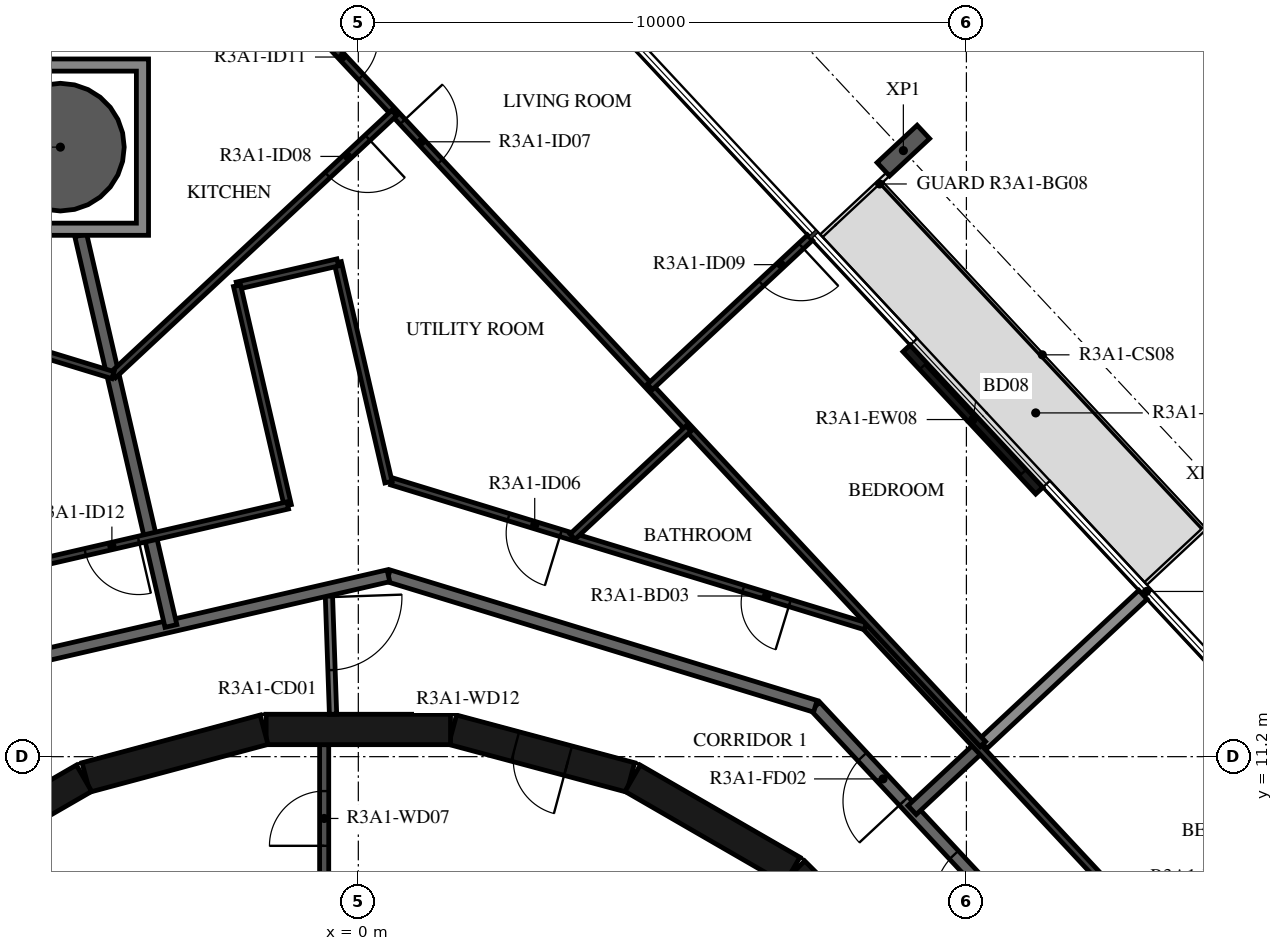
"""IFC4 building model, lengths in metres.
Left out: names, types, materials, properties, quantities, classifications, styles, units other than length and angle.
Written with IfcOpenShell. Run it as: python <this file> out.ifc"""

import sys

from ifc_helpers import new_model, si_unit, direction, frame, frame_2d, origin, origin_2d, place, context, subcontext, project, spatial, polyline, rectangle, hollow_circle, i_section, outline, extrude, element, fill, save


model = new_model("IFC4")
c1 = context("Model", 3, precision=1e-05, world=origin(), true_north=direction((0.0, 1.0)))
c2 = subcontext(c1, "Body", "Model", "MODEL_VIEW")
j1 = project(units=[si_unit("LENGTHUNIT", "METRE"), si_unit("PLANEANGLEUNIT", "RADIAN")], contexts=[c1])
p1 = place(None, origin())
s1 = spatial("IfcSite", under=j1, at=p1, CompositionType="ELEMENT")
p2 = place(p1, origin())
s2 = spatial("IfcBuilding", under=s1, at=p2, CompositionType="ELEMENT")
p3 = place(p2, frame((0.0, 0.0, 116.9)))
s3 = spatial("IfcBuildingStorey", under=s2, at=p3, CompositionType="ELEMENT", Elevation=116.9)
p4 = place(p3, frame((-4.9, 21.223, -0.38), z_axis=(0.0, 0.0, 1.0), x_axis=(1.0, 0.0, 0.0)))
e1 = element("IfcColumn", 1, at=p4, inside=s3, PredefinedType="COLUMN", context=c2, shape_type="SweptSolid", body=[
    extrude(hollow_circle(Radius=1.05, WallThickness=0.05, at=origin_2d()), origin(), (0.0, 0.0, 1.0), 3.5),
])
p5 = place(p3, frame((8.963, 21.167, -0.38), z_axis=(0.0, 0.0, 1.0), x_axis=(0.68199801865, -0.731354019992, 0.0)))
e2 = element("IfcColumn", 2, at=p5, inside=s3, PredefinedType="COLUMN", context=c2, shape_type="SweptSolid", body=[
    extrude(i_section(OverallWidth=0.3, OverallDepth=0.9, WebThickness=0.019, FlangeThickness=0.035, FilletRadius=0.03, at=origin_2d()), origin(), (0.0, 0.0, 1.0), 3.5),
])
p6 = place(p3, frame((11.198, 15.574, 0.0), z_axis=(0.0, 0.0, 1.0), x_axis=(-0.681994703002, 0.731357111866, 0.0)))
e3 = element("IfcWall", 3, at=p6, inside=s3, PredefinedType="STANDARD", context=c2, shape_type="SweptSolid", body=[
    extrude(rectangle(XDim=3.2, YDim=0.16, at=frame_2d((1.6, 0.0))), origin(), (0.0, 0.0, 1.0), 3.12),
])
p7 = place(p6, frame((0.4, 0.0, 0.0)))
e4 = element("IfcOpeningElement", 4, at=p7, cuts=e3, PredefinedType="OPENING", context=c2, shape_type="SweptSolid", body=[
    extrude(rectangle(XDim=2.4, YDim=2.4, at=frame_2d((1.2, 1.2))), frame((0.0, 0.09, 0.0), z_axis=(0.0, -1.0, 0.0), x_axis=(1.0, 0.0, 0.0)), (0.0, 0.0, 1.0), 0.18),
])
p8 = place(p3, frame((9.308, 7.164, 0.0), z_axis=(0.0, 0.0, 1.0), x_axis=(-0.707106781187, 0.707106781187, 0.0)))
e5 = element("IfcWall", 5, at=p8, inside=s3, PredefinedType="SHEAR", context=c2, shape_type="SweptSolid", body=[
    extrude(rectangle(XDim=3.032, YDim=0.5, at=frame_2d((1.516, 0.0))), origin(), (0.0, 0.0, 1.0), 3.12),
])
p9 = place(p8, frame((0.416, 0.0, 0.0)))
e6 = element("IfcOpeningElement", 6, at=p9, cuts=e5, PredefinedType="OPENING", context=c2, shape_type="SweptSolid", body=[
    extrude(rectangle(XDim=1.2, YDim=2.1, at=frame_2d((0.6, 1.05))), frame((0.0, 0.26, 0.0), z_axis=(0.0, -1.0, 0.0), x_axis=(1.0, 0.0, 0.0)), (0.0, 0.0, 1.0), 0.52),
])
p10 = place(p3, frame((7.137, 9.329, 0.0), z_axis=(0.0, 0.0, 1.0), x_axis=(-0.865975092491, 0.500087131594, 0.0)))
e7 = element("IfcWall", 7, at=p10, inside=s3, PredefinedType="SHEAR", context=c2, shape_type="SweptSolid", body=[
    extrude(rectangle(XDim=3.033, YDim=0.5, at=frame_2d((1.516, 0.0))), origin(), (0.0, 0.0, 1.0), 3.12),
])
p11 = place(p3, frame((4.479, 10.858, 0.0), z_axis=(0.0, 0.0, 1.0), x_axis=(-0.965948410781, 0.258734743916, 0.0)))
e8 = element("IfcWall", 8, at=p11, inside=s3, PredefinedType="SHEAR", context=c2, shape_type="SweptSolid", body=[
    extrude(rectangle(XDim=3.033, YDim=0.5, at=frame_2d((1.516, 0.0))), origin(), (0.0, 0.0, 1.0), 3.12),
])
p12 = place(p11, frame((1.066, 0.0, 0.0)))
e9 = element("IfcOpeningElement", 9, at=p12, cuts=e8, PredefinedType="OPENING", context=c2, shape_type="SweptSolid", body=[
    extrude(rectangle(XDim=0.9, YDim=2.1, at=frame_2d((0.45, 1.05))), frame((0.0, 0.26, 0.0), z_axis=(0.0, -1.0, 0.0), x_axis=(1.0, 0.0, 0.0)), (0.0, 0.0, 1.0), 0.52),
])
for number, where, z_axis, x_axis in (
    (10, (1.516, 11.647, 0.0), (0.0, 0.0, 1.0), (-1.0, 0.0, 0.0)),
    (11, (-1.55, 11.643, 0.0), (0.0, 0.0, 1.0), (-0.966, -0.259, 0.0)),
    (12, (-4.51, 10.845, 0.0), (0.0, 0.0, 1.0), (-0.866, -0.5, 0.0)),
):
    element("IfcWall", number, at=place(p3, frame(where, z_axis=z_axis, x_axis=x_axis)), inside=s3, PredefinedType="SHEAR", context=c2, shape_type="SweptSolid", body=[
        extrude(rectangle(XDim=3.033, YDim=0.5, at=frame_2d((1.516, 0.0))), origin(), (0.0, 0.0, 1.0), 3.12),
    ])
p13 = place(p3, frame((-0.562, 8.97, 0.0), z_axis=(0.0, 0.0, 1.0), x_axis=(0.0, 1.0, 0.0)))
e13 = element("IfcWall", 13, at=p13, inside=s3, PredefinedType="PARTITIONING", context=c2, shape_type="SweptSolid", body=[
    extrude(rectangle(XDim=2.427, YDim=0.15, at=frame_2d((1.214, 0.0))), origin(), (0.0, 0.0, 1.0), 3.12),
])
p14 = place(p13, frame((0.764, 0.0, 0.0)))
e14 = element("IfcOpeningElement", 14, at=p14, cuts=e13, PredefinedType="OPENING", context=c2, shape_type="SweptSolid", body=[
    extrude(rectangle(XDim=0.9, YDim=2.1, at=frame_2d((0.45, 1.05))), frame((0.0, 0.085, 0.0), z_axis=(0.0, -1.0, 0.0), x_axis=(1.0, 0.0, 0.0)), (0.0, 0.0, 1.0), 0.17),
])
p15 = place(p3, frame((-0.487, 13.948, 0.0), z_axis=(0.0, 0.0, 1.0), x_axis=(0.034859752231, -0.999392214135, 0.0)))
e15 = element("IfcWall", 15, at=p15, inside=s3, PredefinedType="PARTITIONING", context=c2, shape_type="SweptSolid", body=[
    extrude(rectangle(XDim=2.052, YDim=0.12, at=frame_2d((1.026, 0.0))), origin(), (0.0, 0.0, 1.0), 3.12),
])
p16 = place(p15, frame((0.125, 0.0, 0.0)))
e16 = element("IfcOpeningElement", 16, at=p16, cuts=e15, PredefinedType="OPENING", context=c2, shape_type="SweptSolid", body=[
    extrude(rectangle(XDim=1.2, YDim=2.1, at=frame_2d((0.6, 1.05))), frame((0.0, 0.07, 0.0), z_axis=(0.0, -1.0, 0.0), x_axis=(1.0, 0.0, 0.0)), (0.0, 0.0, 1.0), 0.14),
])
p17 = place(p3, frame((12.523, 6.659, 0.0), z_axis=(0.0, 0.0, 1.0), x_axis=(-0.682001841105, 0.731350455479, 0.0)))
e17 = element("IfcWall", 17, at=p17, inside=s3, PredefinedType="STANDARD", context=c2, shape_type="SweptSolid", body=[
    extrude(rectangle(XDim=7.342, YDim=0.2, at=frame_2d((3.671, 0.0))), origin(), (0.0, 0.0, 1.0), 3.12),
])
p18 = place(p17, frame((3.0, 0.0, 0.0)))
e18 = element("IfcOpeningElement", 18, at=p18, cuts=e17, PredefinedType="OPENING", context=c2, shape_type="SweptSolid", body=[
    extrude(rectangle(XDim=1.0, YDim=2.1, at=frame_2d((0.5, 1.05))), frame((0.0, 0.11, 0.0), z_axis=(0.0, -1.0, 0.0), x_axis=(1.0, 0.0, 0.0)), (0.0, 0.0, 1.0), 0.22),
])
p19 = place(p17, frame((5.209, 0.0, 0.0)))
e19 = element("IfcOpeningElement", 19, at=p19, cuts=e17, PredefinedType="OPENING", context=c2, shape_type="SweptSolid", body=[
    extrude(rectangle(XDim=1.0, YDim=2.1, at=frame_2d((0.5, 1.05))), frame((0.0, 0.11, 0.0), z_axis=(0.0, -1.0, 0.0), x_axis=(1.0, 0.0, 0.0)), (0.0, 0.0, 1.0), 0.22),
])
p20 = place(p3, frame((7.516, 12.028, 0.0), z_axis=(0.0, 0.0, 1.0), x_axis=(-0.956306642771, 0.292365533182, 0.0)))
e20 = element("IfcWall", 20, at=p20, inside=s3, PredefinedType="STANDARD", context=c2, shape_type="SweptSolid", body=[
    extrude(rectangle(XDim=7.342, YDim=0.2, at=frame_2d((3.671, 0.0))), origin(), (0.0, 0.0, 1.0), 3.12),
])
p21 = place(p3, frame((0.495, 14.175, 0.0), z_axis=(0.0, 0.0, 1.0), x_axis=(-0.974376622151, -0.224922649383, 0.0)))
e21 = element("IfcWall", 21, at=p21, inside=s3, PredefinedType="STANDARD", context=c2, shape_type="SweptSolid", body=[
    extrude(rectangle(XDim=7.342, YDim=0.2, at=frame_2d((3.671, 0.0))), origin(), (0.0, 0.0, 1.0), 3.12),
])
p22 = place(p3, frame((10.233, 11.372, 0.0), z_axis=(0.0, 0.0, 1.0), x_axis=(-0.731329353292, -0.682024469513, 0.0)))
e22 = element("IfcWall", 22, at=p22, inside=s3, PredefinedType="STANDARD", context=c2, shape_type="SweptSolid", body=[
    extrude(rectangle(XDim=1.54, YDim=0.2, at=frame_2d((0.77, 0.0))), origin(), (0.0, 0.0, 1.0), 3.12),
])
p23 = place(p3, frame((12.903, 13.862, 0.0), z_axis=(0.0, 0.0, 1.0), x_axis=(-0.731328084739, -0.682025829769, 0.0)))
e23 = element("IfcWall", 23, at=p23, inside=s3, PredefinedType="STANDARD", context=c2, shape_type="SweptSolid", body=[
    extrude(rectangle(XDim=3.6, YDim=0.2, at=frame_2d((1.8, 0.0))), origin(), (0.0, 0.0, 1.0), 2.73),
])
p24 = place(p3, frame((-4.565, 19.773, 0.0), z_axis=(0.0, 0.0, 1.0), x_axis=(0.224940633072, -0.974372470667, 0.0)))
e24 = element("IfcWall", 24, at=p24, inside=s3, PredefinedType="STANDARD", context=c2, shape_type="SweptSolid", body=[
    extrude(rectangle(XDim=6.594, YDim=0.2, at=frame_2d((3.297, 0.0))), origin(), (0.0, 0.0, 1.0), 3.12),
])
p25 = place(p3, frame((13.894, 7.388, 0.0), z_axis=(0.0, 0.0, 1.0), x_axis=(-0.681994622729, 0.731357186721, 0.0)))
e25 = element("IfcWall", 25, at=p25, inside=s3, PredefinedType="PARTITIONING", context=c2, shape_type="SweptSolid", body=[
    extrude(rectangle(XDim=8.146, YDim=0.12, at=frame_2d((4.073, 0.0))), origin(), (0.0, 0.0, 1.0), 3.12),
])
p26 = place(p25, frame((0.2, 0.0, 0.0)))
e26 = element("IfcOpeningElement", 26, at=p26, cuts=e25, PredefinedType="OPENING", context=c2, shape_type="SweptSolid", body=[
    extrude(rectangle(XDim=0.9, YDim=2.1, at=frame_2d((0.45, 1.05))), frame((0.0, 0.07, 0.0), z_axis=(0.0, -1.0, 0.0), x_axis=(1.0, 0.0, 0.0)), (0.0, 0.0, 1.0), 0.14),
])
p27 = place(p3, frame((8.339, 13.345, 0.0), z_axis=(0.0, 0.0, 1.0), x_axis=(-0.956310145342, 0.292354076276, 0.0)))
e27 = element("IfcWall", 27, at=p27, inside=s3, PredefinedType="PARTITIONING", context=c2, shape_type="SweptSolid", body=[
    extrude(rectangle(XDim=8.146, YDim=0.12, at=frame_2d((4.073, 0.0))), origin(), (0.0, 0.0, 1.0), 3.12),
])
p28 = place(p27, frame((1.3, 0.0, 0.0)))
e28 = element("IfcOpeningElement", 28, at=p28, cuts=e27, PredefinedType="OPENING", context=c2, shape_type="SweptSolid", body=[
    extrude(rectangle(XDim=0.8, YDim=2.1, at=frame_2d((0.4, 1.05))), frame((0.0, 0.07, 0.0), z_axis=(0.0, -1.0, 0.0), x_axis=(1.0, 0.0, 0.0)), (0.0, 0.0, 1.0), 0.14),
])
p29 = place(p27, frame((5.237, 0.0, 0.0)))
e29 = element("IfcOpeningElement", 29, at=p29, cuts=e27, PredefinedType="OPENING", context=c2, shape_type="SweptSolid", body=[
    extrude(rectangle(XDim=0.9, YDim=2.1, at=frame_2d((0.45, 1.05))), frame((0.0, 0.07, 0.0), z_axis=(0.0, -1.0, 0.0), x_axis=(1.0, 0.0, 0.0)), (0.0, 0.0, 1.0), 0.14),
])
p30 = place(p3, frame((0.496, 15.714, 0.0), z_axis=(0.0, 0.0, 1.0), x_axis=(-0.224960478174, 0.974367889075, 0.0)))
e30 = element("IfcWall", 30, at=p30, inside=s3, PredefinedType="PARTITIONING", context=c2, shape_type="SweptSolid", body=[
    extrude(rectangle(XDim=3.708, YDim=0.12, at=frame_2d((1.854, 0.0))), origin(), (0.0, 0.0, 1.0), 3.12),
])
p31 = place(p3, frame((-0.338, 19.328, 0.0), z_axis=(0.0, 0.0, 1.0), x_axis=(-0.974383934081, -0.224890971374, 0.0)))
e31 = element("IfcWall", 31, at=p31, inside=s3, PredefinedType="PARTITIONING", context=c2, shape_type="SweptSolid", body=[
    extrude(rectangle(XDim=1.7, YDim=0.12, at=frame_2d((0.85, 0.0))), origin(), (0.0, 0.0, 1.0), 3.12),
])
p32 = place(p3, frame((-1.995, 18.945, 0.0), z_axis=(0.0, 0.0, 1.0), x_axis=(0.224946048274, -0.974371220514, 0.0)))
e32 = element("IfcWall", 32, at=p32, inside=s3, PredefinedType="PARTITIONING", context=c2, shape_type="SweptSolid", body=[
    extrude(rectangle(XDim=3.708, YDim=0.12, at=frame_2d((1.854, 0.0))), origin(), (0.0, 0.0, 1.0), 3.12),
])
p33 = place(p3, frame((-1.161, 15.332, 0.0), z_axis=(0.0, 0.0, 1.0), x_axis=(-0.974373440078, -0.224936433845, 0.0)))
e33 = element("IfcWall", 33, at=p33, inside=s3, PredefinedType="PARTITIONING", context=c2, shape_type="SweptSolid", body=[
    extrude(rectangle(XDim=4.636, YDim=0.12, at=frame_2d((2.318, 0.0))), origin(), (0.0, 0.0, 1.0), 3.12),
])
p34 = place(p33, frame((2.518, 0.0, 0.0)))
e34 = element("IfcOpeningElement", 34, at=p34, cuts=e33, PredefinedType="OPENING", context=c2, shape_type="SweptSolid", body=[
    extrude(rectangle(XDim=0.9, YDim=2.1, at=frame_2d((0.45, 1.05))), frame((0.0, 0.07, 0.0), z_axis=(0.0, -1.0, 0.0), x_axis=(1.0, 0.0, 0.0)), (0.0, 0.0, 1.0), 0.14),
])
p35 = place(p3, frame((-1.539, 24.071, 0.0), z_axis=(0.0, 0.0, 1.0), x_axis=(0.68200220595, -0.731350115252, 0.0)))
e35 = element("IfcWall", 35, at=p35, inside=s3, PredefinedType="PARTITIONING", context=c2, shape_type="SweptSolid", body=[
    extrude(rectangle(XDim=17.316, YDim=0.12, at=frame_2d((8.658, 0.0))), origin(), (0.0, 0.0, 1.0), 3.12),
])
p36 = place(p35, frame((3.323, 0.0, 0.0)))
e36 = element("IfcOpeningElement", 36, at=p36, cuts=e35, PredefinedType="OPENING", context=c2, shape_type="SweptSolid", body=[
    extrude(rectangle(XDim=0.9, YDim=2.1, at=frame_2d((0.45, 1.05))), frame((0.0, 0.07, 0.0), z_axis=(0.0, -1.0, 0.0), x_axis=(1.0, 0.0, 0.0)), (0.0, 0.0, 1.0), 0.14),
])
p37 = place(p35, frame((1.417, 0.0, 0.0)))
e37 = element("IfcOpeningElement", 37, at=p37, cuts=e35, PredefinedType="OPENING", context=c2, shape_type="SweptSolid", body=[
    extrude(rectangle(XDim=0.9, YDim=2.1, at=frame_2d((0.45, 1.05))), frame((0.0, 0.07, 0.0), z_axis=(0.0, -1.0, 0.0), x_axis=(1.0, 0.0, 0.0)), (0.0, 0.0, 1.0), 0.14),
])
p38 = place(p3, frame((7.427, 19.734, 0.0), z_axis=(0.0, 0.0, 1.0), x_axis=(-0.73139345201, -0.681955730497, 0.0)))
e38 = element("IfcWall", 38, at=p38, inside=s3, PredefinedType="PARTITIONING", context=c2, shape_type="SweptSolid", body=[
    extrude(rectangle(XDim=3.6, YDim=0.12, at=frame_2d((1.8, 0.0))), origin(), (0.0, 0.0, 1.0), 2.73),
])
p39 = place(p38, frame((0.2, 0.0, 0.0)))
e39 = element("IfcOpeningElement", 39, at=p39, cuts=e38, PredefinedType="OPENING", context=c2, shape_type="SweptSolid", body=[
    extrude(rectangle(XDim=0.9, YDim=2.1, at=frame_2d((0.45, 1.05))), frame((0.0, 0.07, 0.0), z_axis=(0.0, -1.0, 0.0), x_axis=(1.0, 0.0, 0.0)), (0.0, 0.0, 1.0), 0.14),
])
p40 = place(p3, frame((5.431, 16.597, 0.0), z_axis=(0.0, 0.0, 1.0), x_axis=(-0.731378807316, -0.681971436505, 0.0)))
e40 = element("IfcWall", 40, at=p40, inside=s3, PredefinedType="PARTITIONING", context=c2, shape_type="SweptSolid", body=[
    extrude(rectangle(XDim=2.609, YDim=0.12, at=frame_2d((1.305, 0.0))), origin(), (0.0, 0.0, 1.0), 3.12),
])
p41 = place(p3, frame((0.591, 21.787, 0.0), z_axis=(0.0, 0.0, 1.0), x_axis=(-0.731363296574, -0.681988070588, 0.0)))
e41 = element("IfcWall", 41, at=p41, inside=s3, PredefinedType="PARTITIONING", context=c2, shape_type="SweptSolid", body=[
    extrude(rectangle(XDim=6.324, YDim=0.12, at=frame_2d((3.162, 0.0))), origin(), (0.0, 0.0, 1.0), 3.12),
])
p42 = place(p41, frame((0.6, 0.0, 0.0)))
e42 = element("IfcOpeningElement", 42, at=p42, cuts=e41, PredefinedType="OPENING", context=c2, shape_type="SweptSolid", body=[
    extrude(rectangle(XDim=0.9, YDim=2.1, at=frame_2d((0.45, 1.05))), frame((0.0, 0.07, 0.0), z_axis=(0.0, -1.0, 0.0), x_axis=(1.0, 0.0, 0.0)), (0.0, 0.0, 1.0), 0.14),
])
p43 = place(p3, frame((-10.082, 19.323, 0.0), z_axis=(0.0, 0.0, 1.0), x_axis=(0.956300011431, -0.292387222936, 0.0)))
e43 = element("IfcWall", 43, at=p43, inside=s3, PredefinedType="PARTITIONING", context=c2, shape_type="SweptSolid", body=[
    extrude(rectangle(XDim=6.324, YDim=0.12, at=frame_2d((3.162, 0.0))), origin(), (0.0, 0.0, 1.0), 3.12),
])
p44 = place(p43, frame((0.2, 0.0, 0.0)))
e44 = element("IfcOpeningElement", 44, at=p44, cuts=e43, PredefinedType="OPENING", context=c2, shape_type="SweptSolid", body=[
    extrude(rectangle(XDim=0.9, YDim=2.1, at=frame_2d((0.45, 1.05))), frame((0.0, 0.07, 0.0), z_axis=(0.0, -1.0, 0.0), x_axis=(1.0, 0.0, 0.0)), (0.0, 0.0, 1.0), 0.14),
])
p45 = place(p3, origin())
e45 = element("IfcWall", 45, at=p45, inside=s3, PredefinedType="STANDARD", context=c2, shape_type="SweptSolid", body=[
    extrude(outline(polyline([(-3.45, 22.674), (-3.45, 19.773), (-6.35, 19.773), (-6.35, 22.674), (-3.45, 22.674)]), holes=[polyline([(-6.15, 19.973), (-3.65, 19.973), (-3.65, 22.473), (-6.15, 22.473), (-6.15, 19.973)])]), origin(), (0.0, 0.0, 1.0), 3.12),
])
p46 = place(p7, origin())
e46 = element("IfcDoor", 46, at=p46, inside=s3, OperationType="DOUBLE_DOOR_SLIDING", PredefinedType="DOOR", context=c2, shape_type="SweptSolid", body=[
    extrude(rectangle(XDim=2.4, YDim=2.4, at=frame_2d((1.2, 1.2))), frame((0.0, 0.025, 0.0), z_axis=(0.0, -1.0, 0.0), x_axis=(1.0, 0.0, 0.0)), (0.0, 0.0, 1.0), 0.05),
])
fill(e4, e46)
p47 = place(p14, origin())
e47 = element("IfcDoor", 47, at=p47, inside=s3, OperationType="SINGLE_SWING_RIGHT", PredefinedType="DOOR", context=c2, shape_type="SweptSolid", body=[
    extrude(rectangle(XDim=0.9, YDim=2.1, at=frame_2d((0.45, 1.05))), frame((0.0, 0.025, 0.0), z_axis=(0.0, -1.0, 0.0), x_axis=(1.0, 0.0, 0.0)), (0.0, 0.0, 1.0), 0.05),
])
fill(e14, e47)
p48 = place(p12, origin())
e48 = element("IfcDoor", 48, at=p48, inside=s3, OperationType="SINGLE_SWING_LEFT", PredefinedType="DOOR", context=c2, shape_type="SweptSolid", body=[
    extrude(rectangle(XDim=0.9, YDim=2.1, at=frame_2d((0.45, 1.05))), frame((0.0, 0.025, 0.0), z_axis=(0.0, -1.0, 0.0), x_axis=(1.0, 0.0, 0.0)), (0.0, 0.0, 1.0), 0.05),
])
fill(e9, e48)
p49 = place(p18, origin())
e49 = element("IfcDoor", 49, at=p49, inside=s3, OperationType="SINGLE_SWING_LEFT", PredefinedType="DOOR", context=c2, shape_type="SweptSolid", body=[
    extrude(rectangle(XDim=1.0, YDim=2.1, at=frame_2d((0.5, 1.05))), frame((0.0, 0.025, 0.0), z_axis=(0.0, -1.0, 0.0), x_axis=(1.0, 0.0, 0.0)), (0.0, 0.0, 1.0), 0.05),
])
fill(e18, e49)
p50 = place(p19, origin())
e50 = element("IfcDoor", 50, at=p50, inside=s3, OperationType="SINGLE_SWING_RIGHT", PredefinedType="DOOR", context=c2, shape_type="SweptSolid", body=[
    extrude(rectangle(XDim=1.0, YDim=2.1, at=frame_2d((0.5, 1.05))), frame((0.0, 0.025, 0.0), z_axis=(0.0, -1.0, 0.0), x_axis=(1.0, 0.0, 0.0)), (0.0, 0.0, 1.0), 0.05),
])
fill(e19, e50)
p51 = place(p28, origin())
e51 = element("IfcDoor", 51, at=p51, inside=s3, OperationType="SINGLE_SWING_RIGHT", PredefinedType="DOOR", context=c2, shape_type="SweptSolid", body=[
    extrude(rectangle(XDim=0.8, YDim=2.1, at=frame_2d((0.4, 1.05))), frame((0.0, 0.025, 0.0), z_axis=(0.0, -1.0, 0.0), x_axis=(1.0, 0.0, 0.0)), (0.0, 0.0, 1.0), 0.05),
])
fill(e28, e51)
p52 = place(p29, origin())
e52 = element("IfcDoor", 52, at=p52, inside=s3, OperationType="SINGLE_SWING_RIGHT", PredefinedType="DOOR", context=c2, shape_type="SweptSolid", body=[
    extrude(rectangle(XDim=0.9, YDim=2.1, at=frame_2d((0.45, 1.05))), frame((0.0, 0.025, 0.0), z_axis=(0.0, -1.0, 0.0), x_axis=(1.0, 0.0, 0.0)), (0.0, 0.0, 1.0), 0.05),
])
fill(e29, e52)
p53 = place(p36, origin())
e53 = element("IfcDoor", 53, at=p53, inside=s3, OperationType="SINGLE_SWING_RIGHT", PredefinedType="DOOR", context=c2, shape_type="SweptSolid", body=[
    extrude(rectangle(XDim=0.9, YDim=2.1, at=frame_2d((0.45, 1.05))), frame((0.0, 0.025, 0.0), z_axis=(0.0, -1.0, 0.0), x_axis=(1.0, 0.0, 0.0)), (0.0, 0.0, 1.0), 0.05),
])
fill(e36, e53)
p54 = place(p42, origin())
e54 = element("IfcDoor", 54, at=p54, inside=s3, OperationType="SINGLE_SWING_RIGHT", PredefinedType="DOOR", context=c2, shape_type="SweptSolid", body=[
    extrude(rectangle(XDim=0.9, YDim=2.1, at=frame_2d((0.45, 1.05))), frame((0.0, 0.025, 0.0), z_axis=(0.0, -1.0, 0.0), x_axis=(1.0, 0.0, 0.0)), (0.0, 0.0, 1.0), 0.05),
])
fill(e42, e54)
p55 = place(p39, origin())
e55 = element("IfcDoor", 55, at=p55, inside=s3, OperationType="SINGLE_SWING_LEFT", PredefinedType="DOOR", context=c2, shape_type="SweptSolid", body=[
    extrude(rectangle(XDim=0.9, YDim=2.1, at=frame_2d((0.45, 1.05))), frame((0.0, 0.025, 0.0), z_axis=(0.0, -1.0, 0.0), x_axis=(1.0, 0.0, 0.0)), (0.0, 0.0, 1.0), 0.05),
])
fill(e39, e55)
p56 = place(p37, origin())
e56 = element("IfcDoor", 56, at=p56, inside=s3, OperationType="SINGLE_SWING_LEFT", PredefinedType="DOOR", context=c2, shape_type="SweptSolid", body=[
    extrude(rectangle(XDim=0.9, YDim=2.1, at=frame_2d((0.45, 1.05))), frame((0.0, 0.025, 0.0), z_axis=(0.0, -1.0, 0.0), x_axis=(1.0, 0.0, 0.0)), (0.0, 0.0, 1.0), 0.05),
])
fill(e37, e56)
p57 = place(p34, origin())
e57 = element("IfcDoor", 57, at=p57, inside=s3, OperationType="SINGLE_SWING_LEFT", PredefinedType="DOOR", context=c2, shape_type="SweptSolid", body=[
    extrude(rectangle(XDim=0.9, YDim=2.1, at=frame_2d((0.45, 1.05))), frame((0.0, 0.025, 0.0), z_axis=(0.0, -1.0, 0.0), x_axis=(1.0, 0.0, 0.0)), (0.0, 0.0, 1.0), 0.05),
])
fill(e34, e57)
p58 = place(p16, origin())
e58 = element("IfcDoor", 58, at=p58, inside=s3, OperationType="DOUBLE_DOOR_SINGLE_SWING", PredefinedType="DOOR", context=c2, shape_type="SweptSolid", body=[
    extrude(rectangle(XDim=1.2, YDim=2.1, at=frame_2d((0.6, 1.05))), frame((0.0, 0.025, 0.0), z_axis=(0.0, -1.0, 0.0), x_axis=(1.0, 0.0, 0.0)), (0.0, 0.0, 1.0), 0.05),
])
fill(e16, e58)
save(model, sys.argv[1])
